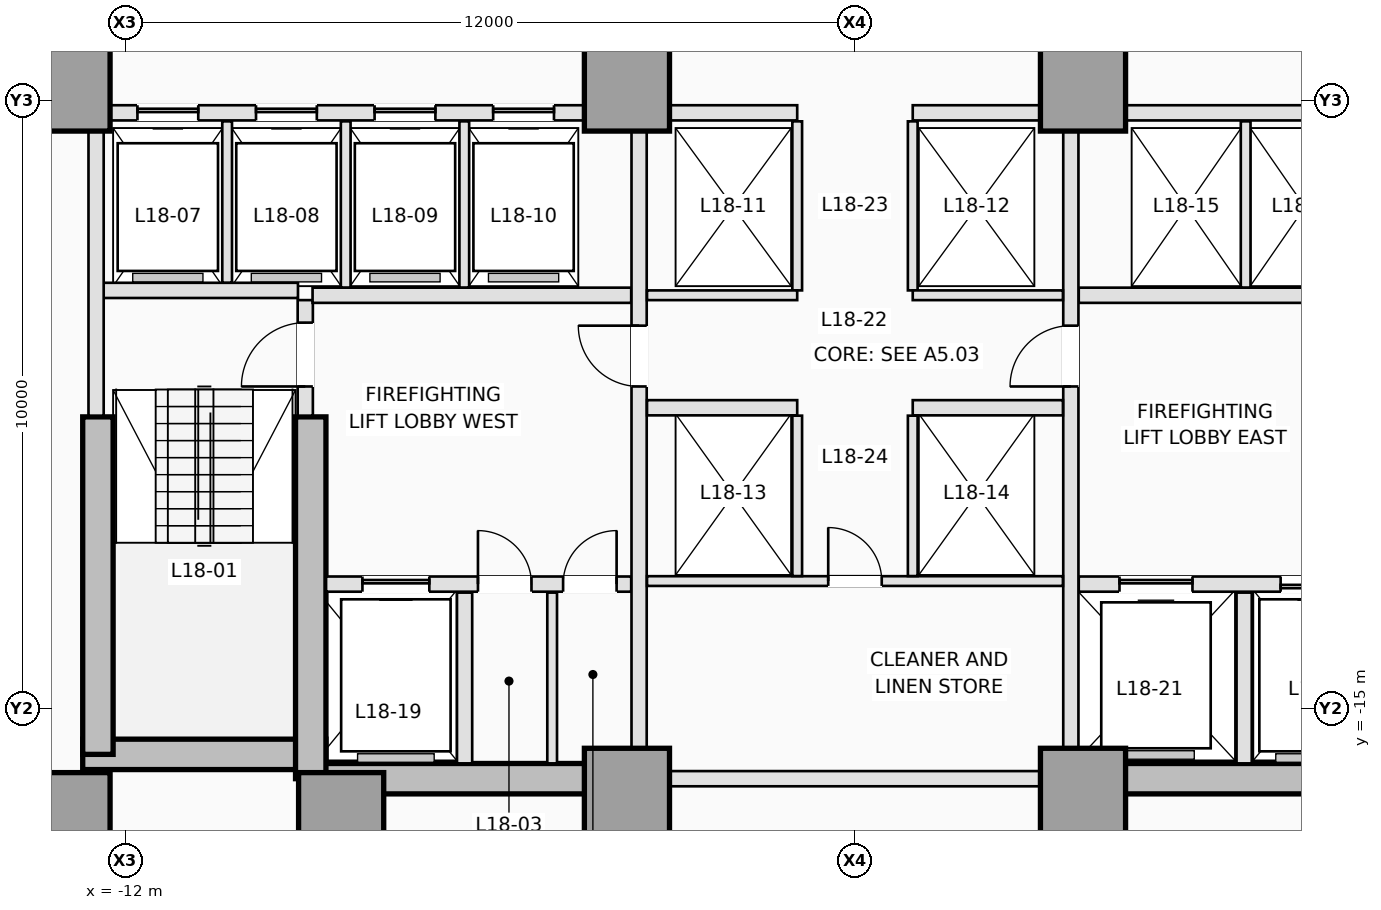
"""IFC4 building model, lengths in metres.
Left out: names, types, materials, properties, quantities, classifications, styles, units other than length and angle.
Written with IfcOpenShell. Run it as: python <this file> out.ifc"""

import sys

from ifc_helpers import new_model, si_unit, direction, frame, frame_2d, origin, origin_2d, place, context, subcontext, project, spatial, rectangle, extrude, element, fill, save


model = new_model("IFC4")
c1 = context("Model", 3, precision=1e-05, world=origin(), true_north=direction((0.0, 1.0)))
c2 = subcontext(c1, "Body", "Model", "MODEL_VIEW")
j1 = project(units=[si_unit("LENGTHUNIT", "METRE"), si_unit("PLANEANGLEUNIT", "RADIAN")], contexts=[c1])
p1 = place(None, origin())
s1 = spatial("IfcSite", under=j1, at=p1, CompositionType="ELEMENT")
p2 = place(p1, origin())
s2 = spatial("IfcBuilding", under=s1, at=p2, CompositionType="ELEMENT")
p3 = place(p2, frame((0.0, 0.0, 69.6)))
s3 = spatial("IfcBuildingStorey", under=s2, at=p3, CompositionType="ELEMENT", Elevation=69.6)
p4 = place(p3, frame((-12.7, -15.75, 0.0), z_axis=(0.0, 0.0, 1.0), x_axis=(1.0, 0.0, 0.0)))
e1 = element("IfcWall", 1, at=p4, inside=s3, PredefinedType="SHEAR", context=c2, shape_type="SweptSolid", body=[
    extrude(rectangle(XDim=4.0, YDim=0.5, at=frame_2d((2.0, 0.0))), origin(), (0.0, 0.0, 1.0), 3.5),
])
for number, where, z_axis, x_axis in (
    (2, (-8.95, -16.15, 0.0), (0.0, 0.0, 1.0), (1.0, 0.0, 0.0)),
    (3, (3.75, -16.15, 0.0), (0.0, 0.0, 1.0), (1.0, 0.0, 0.0)),
):
    element("IfcWall", number, at=place(p3, frame(where, z_axis=z_axis, x_axis=x_axis)), inside=s3, PredefinedType="SHEAR", context=c2, shape_type="SweptSolid", body=[
        extrude(rectangle(XDim=5.2, YDim=0.5, at=frame_2d((2.6, 0.0))), origin(), (0.0, 0.0, 1.0), 3.5),
    ])
p5 = place(p3, frame((-12.45, -15.75, 0.0), z_axis=(0.0, 0.0, 1.0), x_axis=(0.0, 1.0, 0.0)))
e4 = element("IfcWall", 4, at=p5, inside=s3, PredefinedType="SHEAR", context=c2, shape_type="SweptSolid", body=[
    extrude(rectangle(XDim=5.55, YDim=0.5, at=frame_2d((2.775, 0.0))), origin(), (0.0, 0.0, 1.0), 3.5),
])
p6 = place(p3, frame((-8.95, -16.15, 0.0), z_axis=(0.0, 0.0, 1.0), x_axis=(0.0, 1.0, 0.0)))
e5 = element("IfcWall", 5, at=p6, inside=s3, PredefinedType="SHEAR", context=c2, shape_type="SweptSolid", body=[
    extrude(rectangle(XDim=5.95, YDim=0.5, at=frame_2d((2.975, 0.0))), origin(), (0.0, 0.0, 1.0), 3.5),
])
for number, where, z_axis, x_axis in (
    (6, (-12.95, -16.75, 0.0), (0.0, 0.0, 1.0), (1.0, 0.0, 0.0)),
    (7, (-8.45, -16.75, 0.0), (0.0, 0.0, 1.0), (1.0, 0.0, 0.0)),
    (8, (-3.75, -16.35, 0.0), (0.0, 0.0, 1.0), (1.0, 0.0, 0.0)),
    (9, (3.75, -16.35, 0.0), (0.0, 0.0, 1.0), (1.0, 0.0, 0.0)),
    (10, (-12.95, -4.8, 0.0), (0.0, 0.0, 1.0), (1.0, 0.0, 0.0)),
    (11, (-3.75, -4.8, 0.0), (0.0, 0.0, 1.0), (1.0, 0.0, 0.0)),
    (12, (3.75, -4.8, 0.0), (0.0, 0.0, 1.0), (1.0, 0.0, 0.0)),
):
    element("IfcColumn", number, at=place(p3, frame(where, z_axis=z_axis, x_axis=x_axis)), inside=s3, PredefinedType="COLUMN", context=c2, shape_type="SweptSolid", body=[
        extrude(rectangle(XDim=1.4, YDim=1.4, at=origin_2d()), origin(), (0.0, 0.0, 1.0), 3.5),
    ])
p7 = place(p3, frame((-9.04, -10.18, 0.0), z_axis=(0.0, 0.0, 1.0), x_axis=(0.0, 1.0, 0.0)))
e13 = element("IfcWall", 13, at=p7, inside=s3, PredefinedType="PARTITIONING", context=c2, shape_type="SweptSolid", body=[
    extrude(rectangle(XDim=1.9, YDim=0.25, at=frame_2d((0.95, 0.0))), origin(), (0.0, 0.0, 1.0), 3.25),
])
p8 = place(p7, frame((0.48, 0.0, 0.0)))
e14 = element("IfcOpeningElement", 14, at=p8, cuts=e13, PredefinedType="OPENING", context=c2, shape_type="SweptSolid", body=[
    extrude(rectangle(XDim=1.05, YDim=2.15, at=frame_2d((0.525, 1.075))), frame((0.0, 0.135, 0.0), z_axis=(0.0, -1.0, 0.0), x_axis=(1.0, 0.0, 0.0)), (0.0, 0.0, 1.0), 0.27),
])
p9 = place(p3, frame((-12.38, -8.12, 0.0), z_axis=(0.0, 0.0, 1.0), x_axis=(1.0, 0.0, 0.0)))
e15 = element("IfcWall", 15, at=p9, inside=s3, PredefinedType="PARTITIONING", context=c2, shape_type="SweptSolid", body=[
    extrude(rectangle(XDim=3.22, YDim=0.25, at=frame_2d((1.61, 0.0))), origin(), (0.0, 0.0, 1.0), 3.25),
])
p10 = place(p3, frame((-12.48, -10.18, 0.0), z_axis=(0.0, 0.0, 1.0), x_axis=(0.0, 1.0, 0.0)))
e16 = element("IfcWall", 16, at=p10, inside=s3, PredefinedType="PARTITIONING", context=c2, shape_type="SweptSolid", body=[
    extrude(rectangle(XDim=4.678, YDim=0.25, at=frame_2d((2.339, 0.0))), origin(), (0.0, 0.0, 1.0), 3.25),
])
p11 = place(p3, frame((-8.698, -12.95, 0.0), z_axis=(0.0, 0.0, 1.0), x_axis=(1.0, 0.0, 0.0)))
e17 = element("IfcWall", 17, at=p11, inside=s3, PredefinedType="PARTITIONING", context=c2, shape_type="SweptSolid", body=[
    extrude(rectangle(XDim=5.018, YDim=0.25, at=frame_2d((2.509, 0.0))), origin(), (0.0, 0.0, 1.0), 3.25),
])
p12 = place(p11, frame((0.598, 0.0, 0.0)))
e18 = element("IfcOpeningElement", 18, at=p12, cuts=e17, PredefinedType="OPENING", context=c2, shape_type="SweptSolid", body=[
    extrude(rectangle(XDim=1.1, YDim=2.15, at=frame_2d((0.55, 1.075))), frame((0.0, 0.135, 0.0), z_axis=(0.0, -1.0, 0.0), x_axis=(1.0, 0.0, 0.0)), (0.0, 0.0, 1.0), 0.27),
])
p13 = place(p11, frame((2.498, 0.0, 0.0)))
e19 = element("IfcOpeningElement", 19, at=p13, cuts=e17, PredefinedType="OPENING", context=c2, shape_type="SweptSolid", body=[
    extrude(rectangle(XDim=0.88, YDim=2.1, at=frame_2d((0.44, 1.05))), frame((0.0, 0.135, 0.0), z_axis=(0.0, -1.0, 0.0), x_axis=(1.0, 0.0, 0.0)), (0.0, 0.0, 1.0), 0.27),
])
p14 = place(p11, frame((3.898, 0.0, 0.0)))
e20 = element("IfcOpeningElement", 20, at=p14, cuts=e17, PredefinedType="OPENING", context=c2, shape_type="SweptSolid", body=[
    extrude(rectangle(XDim=0.88, YDim=2.1, at=frame_2d((0.44, 1.05))), frame((0.0, 0.135, 0.0), z_axis=(0.0, -1.0, 0.0), x_axis=(1.0, 0.0, 0.0)), (0.0, 0.0, 1.0), 0.27),
])
p15 = place(p3, frame((3.68, -12.95, 0.0), z_axis=(0.0, 0.0, 1.0), x_axis=(1.0, 0.0, 0.0)))
e21 = element("IfcWall", 21, at=p15, inside=s3, PredefinedType="PARTITIONING", context=c2, shape_type="SweptSolid", body=[
    extrude(rectangle(XDim=5.018, YDim=0.25, at=frame_2d((2.509, 0.0))), origin(), (0.0, 0.0, 1.0), 3.25),
])
p16 = place(p15, frame((3.32, 0.0, 0.0)))
e22 = element("IfcOpeningElement", 22, at=p16, cuts=e21, PredefinedType="OPENING", context=c2, shape_type="SweptSolid", body=[
    extrude(rectangle(XDim=1.1, YDim=2.15, at=frame_2d((0.55, 1.075))), frame((0.0, 0.135, 0.0), z_axis=(0.0, -1.0, 0.0), x_axis=(1.0, 0.0, 0.0)), (0.0, 0.0, 1.0), 0.27),
])
p17 = place(p15, frame((0.67, 0.0, 0.0)))
e23 = element("IfcOpeningElement", 23, at=p17, cuts=e21, PredefinedType="OPENING", context=c2, shape_type="SweptSolid", body=[
    extrude(rectangle(XDim=1.2, YDim=2.15, at=frame_2d((0.6, 1.075))), frame((0.0, 0.135, 0.0), z_axis=(0.0, -1.0, 0.0), x_axis=(1.0, 0.0, 0.0)), (0.0, 0.0, 1.0), 0.27),
])
p18 = place(p3, frame((-6.42, -15.898, 0.0), z_axis=(0.0, 0.0, 1.0), x_axis=(0.0, 1.0, 0.0)))
e24 = element("IfcWall", 24, at=p18, inside=s3, PredefinedType="PARTITIONING", context=c2, shape_type="SweptSolid", body=[
    extrude(rectangle(XDim=2.808, YDim=0.25, at=frame_2d((1.404, 0.0))), origin(), (0.0, 0.0, 1.0), 3.25),
])
p19 = place(p3, frame((-4.98, -15.898, 0.0), z_axis=(0.0, 0.0, 1.0), x_axis=(0.0, 1.0, 0.0)))
e25 = element("IfcWall", 25, at=p19, inside=s3, PredefinedType="PARTITIONING", context=c2, shape_type="SweptSolid", body=[
    extrude(rectangle(XDim=2.808, YDim=0.16, at=frame_2d((1.404, 0.0))), origin(), (0.0, 0.0, 1.0), 3.25),
])
p20 = place(p3, frame((6.4, -15.898, 0.0), z_axis=(0.0, 0.0, 1.0), x_axis=(0.0, 1.0, 0.0)))
e26 = element("IfcWall", 26, at=p20, inside=s3, PredefinedType="PARTITIONING", context=c2, shape_type="SweptSolid", body=[
    extrude(rectangle(XDim=2.808, YDim=0.25, at=frame_2d((1.404, 0.0))), origin(), (0.0, 0.0, 1.0), 3.25),
])
for number, where, z_axis, x_axis in (
    (27, (-8.92, -8.2, 0.0), (0.0, 0.0, 1.0), (1.0, 0.0, 0.0)),
    (28, (3.68, -8.2, 0.0), (0.0, 0.0, 1.0), (1.0, 0.0, 0.0)),
):
    element("IfcWall", number, at=place(p3, frame(where, z_axis=z_axis, x_axis=x_axis)), inside=s3, PredefinedType="PARTITIONING", context=c2, shape_type="SweptSolid", body=[
        extrude(rectangle(XDim=5.24, YDim=0.25, at=frame_2d((2.62, 0.0))), origin(), (0.0, 0.0, 1.0), 3.25),
    ])
p21 = place(p3, frame((-3.55, -15.648, 0.0), z_axis=(0.0, 0.0, 1.0), x_axis=(0.0, 1.0, 0.0)))
e29 = element("IfcWall", 29, at=p21, inside=s3, PredefinedType="PARTITIONING", context=c2, shape_type="SweptSolid", body=[
    extrude(rectangle(XDim=10.146, YDim=0.25, at=frame_2d((5.073, 0.0))), origin(), (0.0, 0.0, 1.0), 3.25),
])
p22 = place(p21, frame((5.948, 0.0, 0.0)))
e30 = element("IfcOpeningElement", 30, at=p22, cuts=e29, PredefinedType="OPENING", context=c2, shape_type="SweptSolid", body=[
    extrude(rectangle(XDim=1.0, YDim=2.15, at=frame_2d((0.5, 1.075))), frame((0.0, 0.135, 0.0), z_axis=(0.0, -1.0, 0.0), x_axis=(1.0, 0.0, 0.0)), (0.0, 0.0, 1.0), 0.27),
])
p23 = place(p3, frame((3.55, -15.648, 0.0), z_axis=(0.0, 0.0, 1.0), x_axis=(0.0, 1.0, 0.0)))
e31 = element("IfcWall", 31, at=p23, inside=s3, PredefinedType="PARTITIONING", context=c2, shape_type="SweptSolid", body=[
    extrude(rectangle(XDim=10.146, YDim=0.25, at=frame_2d((5.073, 0.0))), origin(), (0.0, 0.0, 1.0), 3.25),
])
p24 = place(p23, frame((5.948, 0.0, 0.0)))
e32 = element("IfcOpeningElement", 32, at=p24, cuts=e31, PredefinedType="OPENING", context=c2, shape_type="SweptSolid", body=[
    extrude(rectangle(XDim=1.0, YDim=2.15, at=frame_2d((0.5, 1.075))), frame((0.0, 0.135, 0.0), z_axis=(0.0, -1.0, 0.0), x_axis=(1.0, 0.0, 0.0)), (0.0, 0.0, 1.0), 0.27),
])
p25 = place(p3, frame((-12.248, -5.2, 0.0), z_axis=(0.0, 0.0, 1.0), x_axis=(1.0, 0.0, 0.0)))
e33 = element("IfcWall", 33, at=p25, inside=s3, PredefinedType="PARTITIONING", context=c2, shape_type="SweptSolid", body=[
    extrude(rectangle(XDim=7.796, YDim=0.25, at=frame_2d((3.898, 0.0))), origin(), (0.0, 0.0, 1.0), 3.25),
])
p26 = place(p25, frame((0.448, 0.0, 0.0)))
e34 = element("IfcOpeningElement", 34, at=p26, cuts=e33, PredefinedType="OPENING", context=c2, shape_type="SweptSolid", body=[
    extrude(rectangle(XDim=1.0, YDim=2.15, at=frame_2d((0.5, 1.075))), frame((0.0, 0.135, 0.0), z_axis=(0.0, -1.0, 0.0), x_axis=(1.0, 0.0, 0.0)), (0.0, 0.0, 1.0), 0.27),
])
p27 = place(p25, frame((2.398, 0.0, 0.0)))
e35 = element("IfcOpeningElement", 35, at=p27, cuts=e33, PredefinedType="OPENING", context=c2, shape_type="SweptSolid", body=[
    extrude(rectangle(XDim=1.0, YDim=2.15, at=frame_2d((0.5, 1.075))), frame((0.0, 0.135, 0.0), z_axis=(0.0, -1.0, 0.0), x_axis=(1.0, 0.0, 0.0)), (0.0, 0.0, 1.0), 0.27),
])
p28 = place(p25, frame((4.348, 0.0, 0.0)))
e36 = element("IfcOpeningElement", 36, at=p28, cuts=e33, PredefinedType="OPENING", context=c2, shape_type="SweptSolid", body=[
    extrude(rectangle(XDim=1.0, YDim=2.15, at=frame_2d((0.5, 1.075))), frame((0.0, 0.135, 0.0), z_axis=(0.0, -1.0, 0.0), x_axis=(1.0, 0.0, 0.0)), (0.0, 0.0, 1.0), 0.27),
])
p29 = place(p25, frame((6.298, 0.0, 0.0)))
e37 = element("IfcOpeningElement", 37, at=p29, cuts=e33, PredefinedType="OPENING", context=c2, shape_type="SweptSolid", body=[
    extrude(rectangle(XDim=1.0, YDim=2.15, at=frame_2d((0.5, 1.075))), frame((0.0, 0.135, 0.0), z_axis=(0.0, -1.0, 0.0), x_axis=(1.0, 0.0, 0.0)), (0.0, 0.0, 1.0), 0.27),
])
p30 = place(p3, frame((4.452, -5.2, 0.0), z_axis=(0.0, 0.0, 1.0), x_axis=(1.0, 0.0, 0.0)))
e38 = element("IfcWall", 38, at=p30, inside=s3, PredefinedType="PARTITIONING", context=c2, shape_type="SweptSolid", body=[
    extrude(rectangle(XDim=7.796, YDim=0.25, at=frame_2d((3.898, 0.0))), origin(), (0.0, 0.0, 1.0), 3.25),
])
for number, where, z_axis, x_axis in (
    (39, (-3.048, -5.2, 0.0), (0.0, 0.0, 1.0), (1.0, 0.0, 0.0)),
    (40, (0.95, -5.2, 0.0), (0.0, 0.0, 1.0), (1.0, 0.0, 0.0)),
):
    element("IfcWall", number, at=place(p3, frame(where, z_axis=z_axis, x_axis=x_axis)), inside=s3, PredefinedType="PARTITIONING", context=c2, shape_type="SweptSolid", body=[
        extrude(rectangle(XDim=2.098, YDim=0.25, at=frame_2d((1.049, 0.0))), origin(), (0.0, 0.0, 1.0), 3.25),
    ])
p31 = place(p3, frame((-10.325, -7.993, 0.0), z_axis=(0.0, 0.0, 1.0), x_axis=(0.0, 1.0, 0.0)))
e41 = element("IfcWall", 41, at=p31, inside=s3, PredefinedType="PARTITIONING", context=c2, shape_type="SweptSolid", body=[
    extrude(rectangle(XDim=2.653, YDim=0.16, at=frame_2d((1.326, 0.0))), origin(), (0.0, 0.0, 1.0), 3.25),
])
for number, where, z_axis, x_axis in (
    (42, (-8.375, -8.073, 0.0), (0.0, 0.0, 1.0), (0.0, 1.0, 0.0)),
    (43, (-6.425, -8.073, 0.0), (0.0, 0.0, 1.0), (0.0, 1.0, 0.0)),
    (44, (6.425, -8.073, 0.0), (0.0, 0.0, 1.0), (0.0, 1.0, 0.0)),
):
    element("IfcWall", number, at=place(p3, frame(where, z_axis=z_axis, x_axis=x_axis)), inside=s3, PredefinedType="PARTITIONING", context=c2, shape_type="SweptSolid", body=[
        extrude(rectangle(XDim=2.733, YDim=0.16, at=frame_2d((1.366, 0.0))), origin(), (0.0, 0.0, 1.0), 3.25),
    ])
p32 = place(p3, frame((-3.048, -16.15, 0.0), z_axis=(0.0, 0.0, 1.0), x_axis=(1.0, 0.0, 0.0)))
e45 = element("IfcWall", 45, at=p32, inside=s3, PredefinedType="PARTITIONING", context=c2, shape_type="SweptSolid", body=[
    extrude(rectangle(XDim=6.096, YDim=0.25, at=frame_2d((3.048, 0.0))), origin(), (0.0, 0.0, 1.0), 2.3),
])
for number, where, z_axis, x_axis in (
    (46, (-0.95, -8.12, 0.0), (0.0, 0.0, 1.0), (0.0, 1.0, 0.0)),
    (47, (0.95, -8.12, 0.0), (0.0, 0.0, 1.0), (0.0, 1.0, 0.0)),
):
    element("IfcWall", number, at=place(p3, frame(where, z_axis=z_axis, x_axis=x_axis)), inside=s3, PredefinedType="PARTITIONING", context=c2, shape_type="SweptSolid", body=[
        extrude(rectangle(XDim=2.78, YDim=0.16, at=frame_2d((1.39, 0.0))), origin(), (0.0, 0.0, 1.0), 3.25),
    ])
for number, where, z_axis, x_axis in (
    (48, (-3.42, -8.2, 0.0), (0.0, 0.0, 1.0), (1.0, 0.0, 0.0)),
    (49, (0.95, -8.2, 0.0), (0.0, 0.0, 1.0), (1.0, 0.0, 0.0)),
):
    element("IfcWall", number, at=place(p3, frame(where, z_axis=z_axis, x_axis=x_axis)), inside=s3, PredefinedType="PARTITIONING", context=c2, shape_type="SweptSolid", body=[
        extrude(rectangle(XDim=2.47, YDim=0.16, at=frame_2d((1.235, 0.0))), origin(), (0.0, 0.0, 1.0), 3.25),
    ])
for number, where, z_axis, x_axis in (
    (50, (-3.42, -10.05, 0.0), (0.0, 0.0, 1.0), (1.0, 0.0, 0.0)),
    (51, (0.95, -10.05, 0.0), (0.0, 0.0, 1.0), (1.0, 0.0, 0.0)),
):
    element("IfcWall", number, at=place(p3, frame(where, z_axis=z_axis, x_axis=x_axis)), inside=s3, PredefinedType="PARTITIONING", context=c2, shape_type="SweptSolid", body=[
        extrude(rectangle(XDim=2.47, YDim=0.25, at=frame_2d((1.235, 0.0))), origin(), (0.0, 0.0, 1.0), 3.25),
    ])
p33 = place(p3, frame((-3.42, -12.9, 0.0), z_axis=(0.0, 0.0, 1.0), x_axis=(1.0, 0.0, 0.0)))
e52 = element("IfcWall", 52, at=p33, inside=s3, PredefinedType="PARTITIONING", context=c2, shape_type="SweptSolid", body=[
    extrude(rectangle(XDim=6.84, YDim=0.16, at=frame_2d((3.42, 0.0))), origin(), (0.0, 0.0, 1.0), 3.25),
])
p34 = place(p33, frame((2.98, 0.0, 0.0)))
e53 = element("IfcOpeningElement", 53, at=p34, cuts=e52, PredefinedType="OPENING", context=c2, shape_type="SweptSolid", body=[
    extrude(rectangle(XDim=0.88, YDim=2.12, at=frame_2d((0.44, 1.06))), frame((0.0, 0.09, 0.0), z_axis=(0.0, -1.0, 0.0), x_axis=(1.0, 0.0, 0.0)), (0.0, 0.0, 1.0), 0.18),
])
for number, where, z_axis, x_axis in (
    (54, (-0.95, -12.818, 0.0), (0.0, 0.0, 1.0), (0.0, 1.0, 0.0)),
    (55, (0.95, -12.818, 0.0), (0.0, 0.0, 1.0), (0.0, 1.0, 0.0)),
):
    element("IfcWall", number, at=place(p3, frame(where, z_axis=z_axis, x_axis=x_axis)), inside=s3, PredefinedType="PARTITIONING", context=c2, shape_type="SweptSolid", body=[
        extrude(rectangle(XDim=2.638, YDim=0.16, at=frame_2d((1.319, 0.0))), origin(), (0.0, 0.0, 1.0), 3.25),
    ])
p35 = place(p26, origin())
e56 = element("IfcDoor", 56, at=p35, inside=s3, OperationType="SLIDING_TO_LEFT", PredefinedType="DOOR", context=c2, shape_type="SweptSolid", body=[
    extrude(rectangle(XDim=1.0, YDim=2.15, at=frame_2d((0.5, 1.075))), frame((0.0, 0.025, 0.0), z_axis=(0.0, -1.0, 0.0), x_axis=(1.0, 0.0, 0.0)), (0.0, 0.0, 1.0), 0.05),
])
fill(e34, e56)
p36 = place(p27, origin())
e57 = element("IfcDoor", 57, at=p36, inside=s3, OperationType="SLIDING_TO_LEFT", PredefinedType="DOOR", context=c2, shape_type="SweptSolid", body=[
    extrude(rectangle(XDim=1.0, YDim=2.15, at=frame_2d((0.5, 1.075))), frame((0.0, 0.025, 0.0), z_axis=(0.0, -1.0, 0.0), x_axis=(1.0, 0.0, 0.0)), (0.0, 0.0, 1.0), 0.05),
])
fill(e35, e57)
p37 = place(p28, origin())
e58 = element("IfcDoor", 58, at=p37, inside=s3, OperationType="SLIDING_TO_LEFT", PredefinedType="DOOR", context=c2, shape_type="SweptSolid", body=[
    extrude(rectangle(XDim=1.0, YDim=2.15, at=frame_2d((0.5, 1.075))), frame((0.0, 0.025, 0.0), z_axis=(0.0, -1.0, 0.0), x_axis=(1.0, 0.0, 0.0)), (0.0, 0.0, 1.0), 0.05),
])
fill(e36, e58)
p38 = place(p29, origin())
e59 = element("IfcDoor", 59, at=p38, inside=s3, OperationType="SLIDING_TO_LEFT", PredefinedType="DOOR", context=c2, shape_type="SweptSolid", body=[
    extrude(rectangle(XDim=1.0, YDim=2.15, at=frame_2d((0.5, 1.075))), frame((0.0, 0.025, 0.0), z_axis=(0.0, -1.0, 0.0), x_axis=(1.0, 0.0, 0.0)), (0.0, 0.0, 1.0), 0.05),
])
fill(e37, e59)
p39 = place(p12, origin())
e60 = element("IfcDoor", 60, at=p39, inside=s3, OperationType="SLIDING_TO_LEFT", PredefinedType="DOOR", context=c2, shape_type="SweptSolid", body=[
    extrude(rectangle(XDim=1.1, YDim=2.15, at=frame_2d((0.55, 1.075))), frame((0.0, 0.025, 0.0), z_axis=(0.0, -1.0, 0.0), x_axis=(1.0, 0.0, 0.0)), (0.0, 0.0, 1.0), 0.05),
])
fill(e18, e60)
p40 = place(p16, origin())
e61 = element("IfcDoor", 61, at=p40, inside=s3, OperationType="SLIDING_TO_RIGHT", PredefinedType="DOOR", context=c2, shape_type="SweptSolid", body=[
    extrude(rectangle(XDim=1.1, YDim=2.15, at=frame_2d((0.55, 1.075))), frame((0.0, 0.025, 0.0), z_axis=(0.0, -1.0, 0.0), x_axis=(1.0, 0.0, 0.0)), (0.0, 0.0, 1.0), 0.05),
])
fill(e22, e61)
p41 = place(p17, origin())
e62 = element("IfcDoor", 62, at=p41, inside=s3, OperationType="SLIDING_TO_LEFT", PredefinedType="DOOR", context=c2, shape_type="SweptSolid", body=[
    extrude(rectangle(XDim=1.2, YDim=2.15, at=frame_2d((0.6, 1.075))), frame((0.0, 0.025, 0.0), z_axis=(0.0, -1.0, 0.0), x_axis=(1.0, 0.0, 0.0)), (0.0, 0.0, 1.0), 0.05),
])
fill(e23, e62)
p42 = place(p8, origin())
e63 = element("IfcDoor", 63, at=p42, inside=s3, OperationType="SINGLE_SWING_LEFT", PredefinedType="DOOR", context=c2, shape_type="SweptSolid", body=[
    extrude(rectangle(XDim=1.05, YDim=2.15, at=frame_2d((0.525, 1.075))), frame((0.0, 0.025, 0.0), z_axis=(0.0, -1.0, 0.0), x_axis=(1.0, 0.0, 0.0)), (0.0, 0.0, 1.0), 0.05),
])
fill(e14, e63)
p43 = place(p13, origin())
e64 = element("IfcDoor", 64, at=p43, inside=s3, OperationType="SINGLE_SWING_LEFT", PredefinedType="TRAPDOOR", context=c2, shape_type="SweptSolid", body=[
    extrude(rectangle(XDim=0.88, YDim=2.1, at=frame_2d((0.44, 1.05))), frame((0.0, 0.025, 0.0), z_axis=(0.0, -1.0, 0.0), x_axis=(1.0, 0.0, 0.0)), (0.0, 0.0, 1.0), 0.05),
])
fill(e19, e64)
p44 = place(p14, origin())
e65 = element("IfcDoor", 65, at=p44, inside=s3, OperationType="SINGLE_SWING_RIGHT", PredefinedType="TRAPDOOR", context=c2, shape_type="SweptSolid", body=[
    extrude(rectangle(XDim=0.88, YDim=2.1, at=frame_2d((0.44, 1.05))), frame((0.0, 0.025, 0.0), z_axis=(0.0, -1.0, 0.0), x_axis=(1.0, 0.0, 0.0)), (0.0, 0.0, 1.0), 0.05),
])
fill(e20, e65)
p45 = place(p22, origin())
e66 = element("IfcDoor", 66, at=p45, inside=s3, OperationType="SINGLE_SWING_RIGHT", PredefinedType="DOOR", context=c2, shape_type="SweptSolid", body=[
    extrude(rectangle(XDim=1.0, YDim=2.15, at=frame_2d((0.5, 1.075))), frame((0.0, 0.025, 0.0), z_axis=(0.0, -1.0, 0.0), x_axis=(1.0, 0.0, 0.0)), (0.0, 0.0, 1.0), 0.05),
])
fill(e30, e66)
p46 = place(p24, origin())
e67 = element("IfcDoor", 67, at=p46, inside=s3, OperationType="SINGLE_SWING_LEFT", PredefinedType="DOOR", context=c2, shape_type="SweptSolid", body=[
    extrude(rectangle(XDim=1.0, YDim=2.15, at=frame_2d((0.5, 1.075))), frame((0.0, 0.025, 0.0), z_axis=(0.0, -1.0, 0.0), x_axis=(1.0, 0.0, 0.0)), (0.0, 0.0, 1.0), 0.05),
])
fill(e32, e67)
p47 = place(p34, origin())
e68 = element("IfcDoor", 68, at=p47, inside=s3, OperationType="SINGLE_SWING_LEFT", PredefinedType="DOOR", context=c2, shape_type="SweptSolid", body=[
    extrude(rectangle(XDim=0.88, YDim=2.12, at=frame_2d((0.44, 1.06))), frame((0.0, 0.025, 0.0), z_axis=(0.0, -1.0, 0.0), x_axis=(1.0, 0.0, 0.0)), (0.0, 0.0, 1.0), 0.05),
])
fill(e53, e68)
save(model, sys.argv[1])
